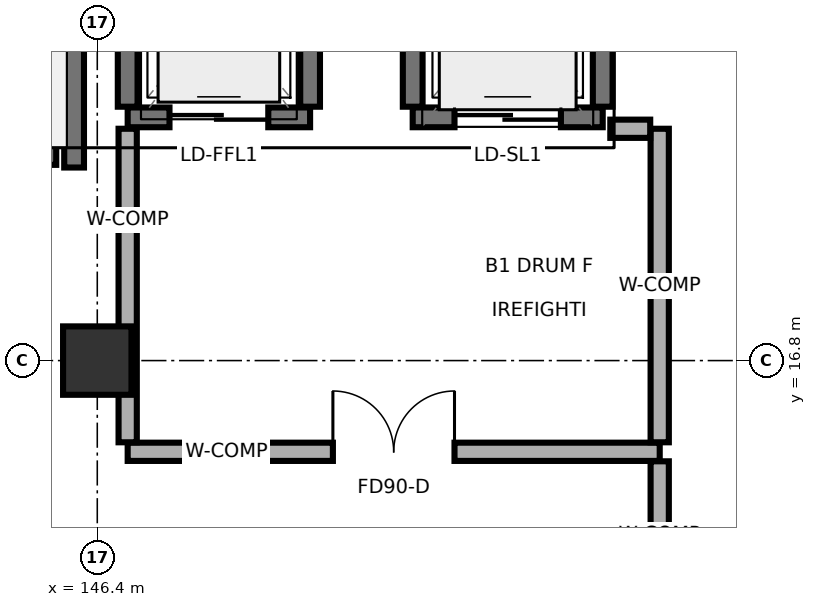
"""IFC4 building model, lengths in metres.
Left out: names, types, materials, properties, quantities, classifications, styles, units other than length and angle.
Written with IfcOpenShell. Run it as: python <this file> out.ifc"""

import sys

from ifc_helpers import new_model, si_unit, direction, frame, frame_2d, origin, origin_2d, place, context, subcontext, project, spatial, rectangle, extrude, element, fill, save


model = new_model("IFC4")
c1 = context("Model", 3, precision=1e-05, world=origin(), true_north=direction((0.0, 1.0)))
c2 = subcontext(c1, "Body", "Model", "MODEL_VIEW")
j1 = project(units=[si_unit("LENGTHUNIT", "METRE"), si_unit("PLANEANGLEUNIT", "RADIAN")], contexts=[c1])
p1 = place(None, origin())
s1 = spatial("IfcSite", under=j1, at=p1, CompositionType="ELEMENT")
p2 = place(p1, origin())
s2 = spatial("IfcBuilding", under=s1, at=p2, CompositionType="ELEMENT")
p3 = place(p2, frame((0.0, 0.0, -4.2)))
s3 = spatial("IfcBuildingStorey", under=s2, at=p3, CompositionType="ELEMENT", Elevation=-4.2)
p4 = place(p3, frame((146.4, 16.8, 0.0), z_axis=(0.0, 0.0, 1.0), x_axis=(1.0, 0.0, 0.0)))
e1 = element("IfcColumn", 1, at=p4, inside=s3, PredefinedType="COLUMN", context=c2, shape_type="SweptSolid", body=[
    extrude(rectangle(XDim=0.9, YDim=0.9, at=origin_2d()), origin(), (0.0, 0.0, 1.0), 4.2),
])
p5 = place(p3, frame((146.095, 19.34, 0.0), z_axis=(0.0, 0.0, 1.0), x_axis=(0.0, 1.0, 0.0)))
e2 = element("IfcWall", 2, at=p5, inside=s3, PredefinedType="SHEAR", context=c2, shape_type="SweptSolid", body=[
    extrude(rectangle(XDim=4.27, YDim=0.26, at=frame_2d((2.135, 0.0))), origin(), (0.0, 0.0, 1.0), 3.88),
])
p6 = place(p3, frame((137.34, 19.505, 0.0), z_axis=(0.0, 0.0, 1.0), x_axis=(1.0, 0.0, 0.0)))
e3 = element("IfcWall", 3, at=p6, inside=s3, PredefinedType="SHEAR", context=c2, shape_type="SweptSolid", body=[
    extrude(rectangle(XDim=8.52, YDim=0.26, at=frame_2d((4.26, 0.0))), origin(), (0.0, 0.0, 1.0), 3.88),
])
p7 = place(p3, frame((146.8, 20.0, 0.0), z_axis=(0.0, 0.0, 1.0), x_axis=(1.0, 0.0, 0.0)))
e4 = element("IfcWall", 4, at=p7, inside=s3, PredefinedType="SHEAR", context=c2, shape_type="SweptSolid", body=[
    extrude(rectangle(XDim=2.4, YDim=0.26, at=frame_2d((1.2, 0.0))), origin(), (0.0, 0.0, 1.0), 3.88),
])
p8 = place(p7, frame((0.55, 0.0, 0.0)))
e5 = element("IfcOpeningElement", 5, at=p8, cuts=e4, PredefinedType="OPENING", context=c2, shape_type="SweptSolid", body=[
    extrude(rectangle(XDim=1.3, YDim=2.25, at=frame_2d((0.65, 1.125))), frame((0.0, 0.14, 0.0), z_axis=(0.0, -1.0, 0.0), x_axis=(1.0, 0.0, 0.0)), (0.0, 0.0, 1.0), 0.28),
])
for number, where, z_axis, x_axis in (
    (6, (146.8, 20.14, 0.0), (0.0, 0.0, 1.0), (0.0, 1.0, 0.0)),
    (7, (149.2, 20.14, 0.0), (0.0, 0.0, 1.0), (0.0, 1.0, 0.0)),
):
    element("IfcWall", number, at=place(p3, frame(where, z_axis=z_axis, x_axis=x_axis)), inside=s3, PredefinedType="SHEAR", context=c2, shape_type="SweptSolid", body=[
        extrude(rectangle(XDim=2.52, YDim=0.26, at=frame_2d((1.26, 0.0))), origin(), (0.0, 0.0, 1.0), 3.88),
    ])
p9 = place(p3, frame((150.55, 20.0, 0.0), z_axis=(0.0, 0.0, 1.0), x_axis=(1.0, 0.0, 0.0)))
e8 = element("IfcWall", 8, at=p9, inside=s3, PredefinedType="SHEAR", context=c2, shape_type="SweptSolid", body=[
    extrude(rectangle(XDim=2.5, YDim=0.26, at=frame_2d((1.25, 0.0))), origin(), (0.0, 0.0, 1.0), 3.88),
])
p10 = place(p9, frame((0.55, 0.0, 0.0)))
e9 = element("IfcOpeningElement", 9, at=p10, cuts=e8, PredefinedType="OPENING", context=c2, shape_type="SweptSolid", body=[
    extrude(rectangle(XDim=1.4, YDim=2.3, at=frame_2d((0.7, 1.15))), frame((0.0, 0.14, 0.0), z_axis=(0.0, -1.0, 0.0), x_axis=(1.0, 0.0, 0.0)), (0.0, 0.0, 1.0), 0.28),
])
for number, where, z_axis, x_axis in (
    (10, (150.55, 20.14, 0.0), (0.0, 0.0, 1.0), (0.0, 1.0, 0.0)),
    (11, (153.05, 20.14, 0.0), (0.0, 0.0, 1.0), (0.0, 1.0, 0.0)),
):
    element("IfcWall", number, at=place(p3, frame(where, z_axis=z_axis, x_axis=x_axis)), inside=s3, PredefinedType="SHEAR", context=c2, shape_type="SweptSolid", body=[
        extrude(rectangle(XDim=2.52, YDim=0.26, at=frame_2d((1.26, 0.0))), origin(), (0.0, 0.0, 1.0), 3.88),
    ])
p11 = place(p3, frame((146.8, 15.6, 0.0), z_axis=(0.0, 0.0, 1.0), x_axis=(1.0, 0.0, 0.0)))
e12 = element("IfcWall", 12, at=p11, inside=s3, PredefinedType="SOLIDWALL", context=c2, shape_type="SweptSolid", body=[
    extrude(rectangle(XDim=7.0, YDim=0.24, at=frame_2d((3.5, 0.0))), origin(), (0.0, 0.0, 1.0), 3.88),
])
p12 = place(p11, frame((2.7, 0.0, 0.0)))
e13 = element("IfcOpeningElement", 13, at=p12, cuts=e12, PredefinedType="OPENING", context=c2, shape_type="SweptSolid", body=[
    extrude(rectangle(XDim=1.6, YDim=2.2, at=frame_2d((0.8, 1.1))), frame((0.0, 0.13, 0.0), z_axis=(0.0, -1.0, 0.0), x_axis=(1.0, 0.0, 0.0)), (0.0, 0.0, 1.0), 0.26),
])
for number, where, z_axis, x_axis in (
    (14, (146.8, 15.725, 0.0), (0.0, 0.0, 1.0), (0.0, 1.0, 0.0)),
    (15, (153.8, 15.725, 0.0), (0.0, 0.0, 1.0), (0.0, 1.0, 0.0)),
):
    element("IfcWall", number, at=place(p3, frame(where, z_axis=z_axis, x_axis=x_axis)), inside=s3, PredefinedType="SOLIDWALL", context=c2, shape_type="SweptSolid", body=[
        extrude(rectangle(XDim=4.125, YDim=0.24, at=frame_2d((2.062, 0.0))), origin(), (0.0, 0.0, 1.0), 3.325),
    ])
p13 = place(p3, frame((153.15, 19.85, 0.0), z_axis=(0.0, 0.0, 1.0), x_axis=(1.0, 0.0, 0.0)))
e16 = element("IfcWall", 16, at=p13, inside=s3, PredefinedType="SOLIDWALL", context=c2, shape_type="SweptSolid", body=[
    extrude(rectangle(XDim=0.525, YDim=0.24, at=frame_2d((0.263, 0.0))), origin(), (0.0, 0.0, 1.0), 3.88),
])
p14 = place(p3, frame((153.8, 13.525, 0.0), z_axis=(0.0, 0.0, 1.0), x_axis=(0.0, 1.0, 0.0)))
e17 = element("IfcWall", 17, at=p14, inside=s3, PredefinedType="SOLIDWALL", context=c2, shape_type="SweptSolid", body=[
    extrude(rectangle(XDim=1.95, YDim=0.24, at=frame_2d((0.975, 0.0))), origin(), (0.0, 0.0, 1.0), 3.88),
])
p15 = place(p8, origin())
e18 = element("IfcDoor", 18, at=p15, inside=s3, OperationType="SLIDING_TO_RIGHT", PredefinedType="DOOR", context=c2, shape_type="SweptSolid", body=[
    extrude(rectangle(XDim=1.3, YDim=2.25, at=frame_2d((0.65, 1.125))), frame((0.0, 0.025, 0.0), z_axis=(0.0, -1.0, 0.0), x_axis=(1.0, 0.0, 0.0)), (0.0, 0.0, 1.0), 0.05),
])
fill(e5, e18)
p16 = place(p10, origin())
e19 = element("IfcDoor", 19, at=p16, inside=s3, OperationType="SLIDING_TO_LEFT", PredefinedType="DOOR", context=c2, shape_type="SweptSolid", body=[
    extrude(rectangle(XDim=1.4, YDim=2.3, at=frame_2d((0.7, 1.15))), frame((0.0, 0.025, 0.0), z_axis=(0.0, -1.0, 0.0), x_axis=(1.0, 0.0, 0.0)), (0.0, 0.0, 1.0), 0.05),
])
fill(e9, e19)
p17 = place(p12, origin())
e20 = element("IfcDoor", 20, at=p17, inside=s3, OperationType="DOUBLE_DOOR_SINGLE_SWING", PredefinedType="DOOR", context=c2, shape_type="SweptSolid", body=[
    extrude(rectangle(XDim=1.6, YDim=2.2, at=frame_2d((0.8, 1.1))), frame((0.0, 0.025, 0.0), z_axis=(0.0, -1.0, 0.0), x_axis=(1.0, 0.0, 0.0)), (0.0, 0.0, 1.0), 0.05),
])
fill(e13, e20)
save(model, sys.argv[1])
